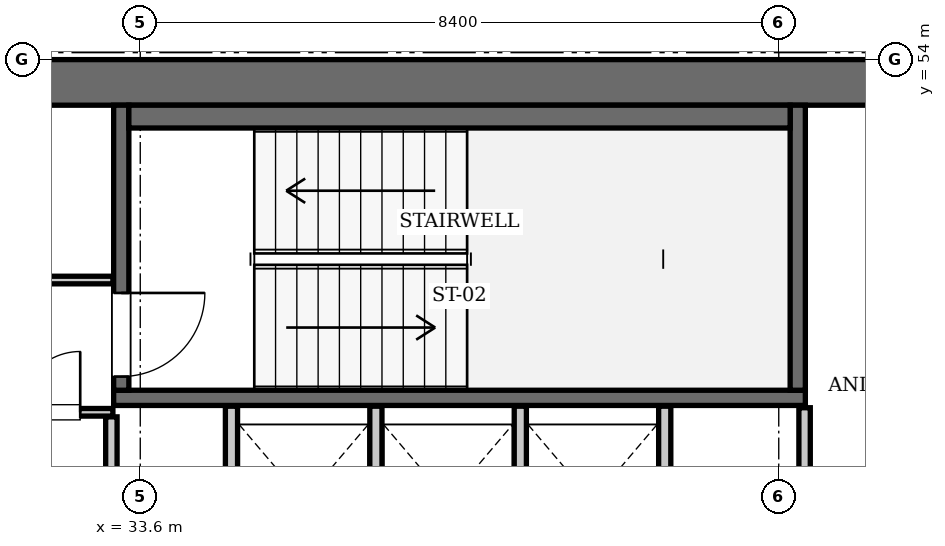
"""IFC4 building model, lengths in metres.
Left out: names, types, materials, properties, quantities, classifications, styles, units other than length and angle.
Written with IfcOpenShell. Run it as: python <this file> out.ifc"""

import sys

from ifc_helpers import new_model, si_unit, direction, frame, frame_2d, origin, place, context, subcontext, project, spatial, rectangle, extrude, element, fill, save


model = new_model("IFC4")
c1 = context("Model", 3, precision=1e-05, world=origin(), true_north=direction((0.0, 1.0)))
c2 = subcontext(c1, "Body", "Model", "MODEL_VIEW")
j1 = project(units=[si_unit("LENGTHUNIT", "METRE"), si_unit("PLANEANGLEUNIT", "RADIAN")], contexts=[c1])
p1 = place(None, origin())
s1 = spatial("IfcSite", under=j1, at=p1, CompositionType="ELEMENT")
p2 = place(p1, origin())
s2 = spatial("IfcBuilding", under=s1, at=p2, CompositionType="ELEMENT")
p3 = place(p2, frame((0.0, 0.0, 308.7)))
s3 = spatial("IfcBuildingStorey", under=s2, at=p3, CompositionType="ELEMENT", Elevation=308.7)
p4 = place(p3, frame((25.2, 53.7, 0.0), z_axis=(0.0, 0.0, 1.0), x_axis=(1.0, 0.0, 0.0)))
e1 = element("IfcWall", 1, at=p4, inside=s3, PredefinedType="SHEAR", context=c2, shape_type="SweptSolid", body=[
    extrude(rectangle(XDim=25.2, YDim=0.6, at=frame_2d((12.6, 0.0))), origin(), (0.0, 0.0, 1.0), 3.85),
])
p5 = place(p3, frame((33.25, 49.55, 0.0), z_axis=(0.0, 0.0, 1.0), x_axis=(1.0, 0.0, 0.0)))
e2 = element("IfcWall", 2, at=p5, inside=s3, PredefinedType="SOLIDWALL", context=c2, shape_type="SweptSolid", body=[
    extrude(rectangle(XDim=9.1, YDim=0.2, at=frame_2d((4.55, 0.0))), origin(), (0.0, 0.0, 1.0), 3.61),
])
p6 = place(p3, frame((42.25, 49.65, 0.0), z_axis=(0.0, 0.0, 1.0), x_axis=(0.0, 1.0, 0.0)))
e3 = element("IfcWall", 3, at=p6, inside=s3, PredefinedType="SOLIDWALL", context=c2, shape_type="SweptSolid", body=[
    extrude(rectangle(XDim=3.75, YDim=0.2, at=frame_2d((1.875, 0.0))), origin(), (0.0, 0.0, 1.0), 3.61),
])
p7 = place(p3, frame((33.35, 49.65, 0.0), z_axis=(0.0, 0.0, 1.0), x_axis=(0.0, 1.0, 0.0)))
e4 = element("IfcWall", 4, at=p7, inside=s3, PredefinedType="SOLIDWALL", context=c2, shape_type="SweptSolid", body=[
    extrude(rectangle(XDim=3.75, YDim=0.2, at=frame_2d((1.875, 0.0))), origin(), (0.0, 0.0, 1.0), 3.61),
])
p8 = place(p7, frame((0.18, 0.0, 0.0)))
e5 = element("IfcOpeningElement", 5, at=p8, cuts=e4, PredefinedType="OPENING", context=c2, shape_type="SweptSolid", body=[
    extrude(rectangle(XDim=1.1, YDim=2.15, at=frame_2d((0.55, 1.075))), frame((0.0, 0.11, 0.0), z_axis=(0.0, -1.0, 0.0), x_axis=(1.0, 0.0, 0.0)), (0.0, 0.0, 1.0), 0.22),
])
p9 = place(p3, frame((33.45, 53.25, 0.0), z_axis=(0.0, 0.0, 1.0), x_axis=(1.0, 0.0, 0.0)))
e6 = element("IfcWall", 6, at=p9, inside=s3, PredefinedType="SOLIDWALL", context=c2, shape_type="SweptSolid", body=[
    extrude(rectangle(XDim=8.7, YDim=0.3, at=frame_2d((4.35, 0.0))), origin(), (0.0, 0.0, 1.0), 3.61),
])
for number, where, z_axis, x_axis in (
    (7, (34.8, 47.25, 0.0), (0.0, 0.0, 1.0), (0.0, 1.0, 0.0)),
    (8, (36.7, 47.25, 0.0), (0.0, 0.0, 1.0), (0.0, 1.0, 0.0)),
    (9, (38.6, 47.25, 0.0), (0.0, 0.0, 1.0), (0.0, 1.0, 0.0)),
    (10, (40.5, 47.25, 0.0), (0.0, 0.0, 1.0), (0.0, 1.0, 0.0)),
):
    element("IfcWall", number, at=place(p3, frame(where, z_axis=z_axis, x_axis=x_axis)), inside=s3, PredefinedType="SOLIDWALL", context=c2, shape_type="SweptSolid", body=[
        extrude(rectangle(XDim=2.19, YDim=0.16, at=frame_2d((1.095, 0.0))), origin(), (0.0, 0.0, 1.0), 3.61),
    ])
p10 = place(p3, frame((33.22, 45.14, 0.0), z_axis=(0.0, 0.0, 1.0), x_axis=(0.0, 1.0, 0.0)))
e11 = element("IfcWall", 11, at=p10, inside=s3, PredefinedType="PARTITIONING", context=c2, shape_type="SweptSolid", body=[
    extrude(rectangle(XDim=4.16, YDim=0.15, at=frame_2d((2.08, 0.0))), origin(), (0.0, 0.0, 1.0), 3.61),
])
p11 = place(p3, frame((30.06, 49.36, 0.0), z_axis=(0.0, 0.0, 1.0), x_axis=(1.0, 0.0, 0.0)))
e12 = element("IfcWall", 12, at=p11, inside=s3, PredefinedType="PARTITIONING", context=c2, shape_type="SweptSolid", body=[
    extrude(rectangle(XDim=3.18, YDim=0.1, at=frame_2d((1.59, 0.0))), origin(), (0.0, 0.0, 1.0), 3.61),
])
p12 = place(p11, frame((1.95, 0.0, 0.0)))
e13 = element("IfcOpeningElement", 13, at=p12, cuts=e12, PredefinedType="OPENING", context=c2, shape_type="SweptSolid", body=[
    extrude(rectangle(XDim=0.8, YDim=2.05, at=frame_2d((0.4, 1.025))), frame((0.0, 0.06, 0.0), z_axis=(0.0, -1.0, 0.0), x_axis=(1.0, 0.0, 0.0)), (0.0, 0.0, 1.0), 0.12),
])
p13 = place(p3, frame((31.82, 51.1, 0.0), z_axis=(0.0, 0.0, 1.0), x_axis=(1.0, 0.0, 0.0)))
e14 = element("IfcWall", 14, at=p13, inside=s3, PredefinedType="PARTITIONING", context=c2, shape_type="SweptSolid", body=[
    extrude(rectangle(XDim=1.42, YDim=0.1, at=frame_2d((0.71, 0.0))), origin(), (0.0, 0.0, 1.0), 3.61),
])
p14 = place(p3, frame((42.34, 46.96, 0.0), z_axis=(0.0, 0.0, 1.0), x_axis=(0.0, 1.0, 0.0)))
e15 = element("IfcWall", 15, at=p14, inside=s3, PredefinedType="PARTITIONING", context=c2, shape_type="SweptSolid", body=[
    extrude(rectangle(XDim=2.46, YDim=0.15, at=frame_2d((1.23, 0.0))), origin(), (0.0, 0.0, 1.0), 3.61),
])
p15 = place(p14, frame((0.24, 0.0, 0.0)))
e16 = element("IfcOpeningElement", 16, at=p15, cuts=e15, PredefinedType="OPENING", context=c2, shape_type="SweptSolid", body=[
    extrude(rectangle(XDim=0.8, YDim=2.05, at=frame_2d((0.4, 1.025))), frame((0.0, 0.085, 0.0), z_axis=(0.0, -1.0, 0.0), x_axis=(1.0, 0.0, 0.0)), (0.0, 0.0, 1.0), 0.17),
])
p16 = place(p8, frame((1.1, 0.0, 0.0), z_axis=(0.0, 0.0, 1.0), x_axis=(-1.0, 0.0, 0.0)))
e17 = element("IfcDoor", 17, at=p16, inside=s3, OperationType="SINGLE_SWING_LEFT", PredefinedType="DOOR", context=c2, shape_type="SweptSolid", body=[
    extrude(rectangle(XDim=1.1, YDim=2.15, at=frame_2d((0.55, 1.075))), frame((0.0, 0.025, 0.0), z_axis=(0.0, -1.0, 0.0), x_axis=(1.0, 0.0, 0.0)), (0.0, 0.0, 1.0), 0.05),
])
fill(e5, e17)
p17 = place(p12, origin())
e18 = element("IfcDoor", 18, at=p17, inside=s3, OperationType="SINGLE_SWING_RIGHT", PredefinedType="DOOR", context=c2, shape_type="SweptSolid", body=[
    extrude(rectangle(XDim=0.8, YDim=2.05, at=frame_2d((0.4, 1.025))), frame((0.0, 0.025, 0.0), z_axis=(0.0, -1.0, 0.0), x_axis=(1.0, 0.0, 0.0)), (0.0, 0.0, 1.0), 0.05),
])
fill(e13, e18)
save(model, sys.argv[1])
